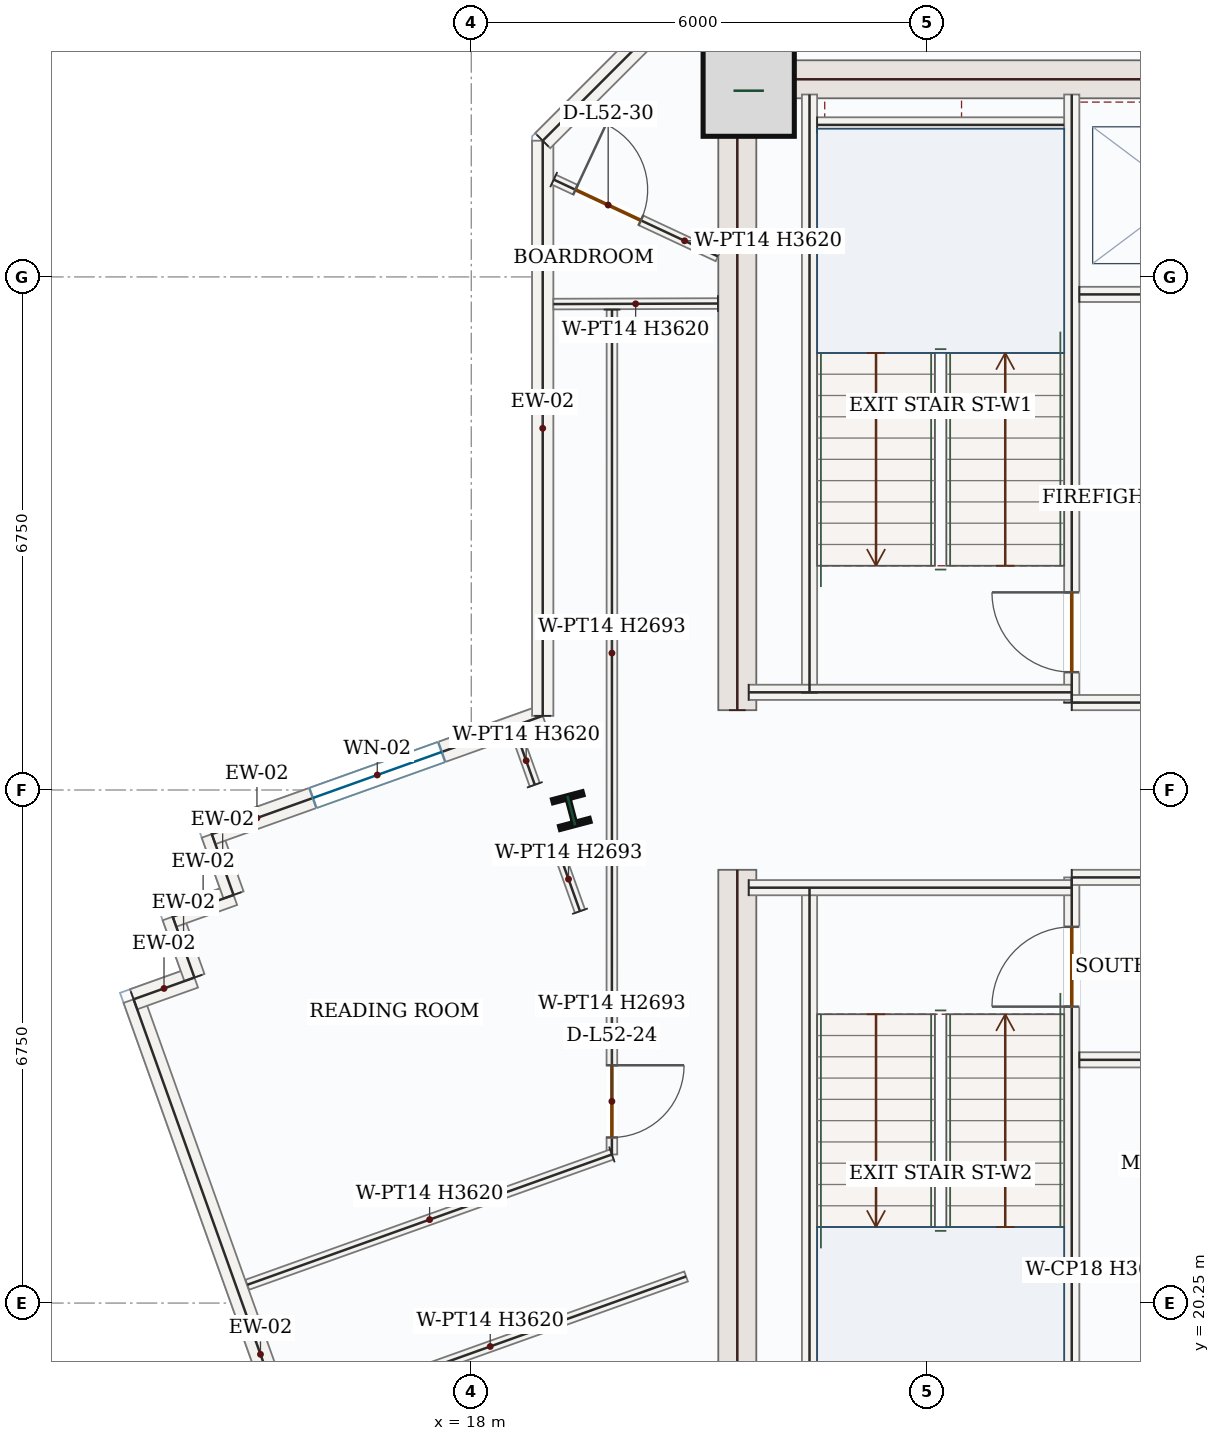
"""IFC4 building model, lengths in metres.
Left out: names, types, materials, properties, quantities, classifications, styles, units other than length and angle.
Written with IfcOpenShell. Run it as: python <this file> out.ifc"""

import sys

from ifc_helpers import new_model, si_unit, direction, frame, frame_2d, origin, origin_2d, place, context, subcontext, project, spatial, rectangle, i_section, extrude, source, transform, mapped, element, fill, save


model = new_model("IFC4")
c1 = context("Model", 3, precision=1e-05, world=origin(), true_north=direction((0.0, 1.0)))
c2 = subcontext(c1, "Body", "Model", "MODEL_VIEW")
j1 = project(units=[si_unit("LENGTHUNIT", "METRE"), si_unit("PLANEANGLEUNIT", "RADIAN")], contexts=[c1])
p1 = place(None, origin())
s1 = spatial("IfcSite", under=j1, at=p1, CompositionType="ELEMENT")
p2 = place(p1, origin())
s2 = spatial("IfcBuilding", under=s1, at=p2, CompositionType="ELEMENT")
p3 = place(p2, frame((0.0, 0.0, 221.4)))
s3 = spatial("IfcBuildingStorey", under=s2, at=p3, CompositionType="ELEMENT", Elevation=221.4)
m1 = source(origin(), c2, "Body", "SweptSolid", [
    extrude(rectangle(XDim=8.55, YDim=0.5, at=frame_2d((4.275, 0.0))), origin(), (0.0, 0.0, 1.0), 3.62),
])
for number, where, z_axis, x_axis in (
    (1, (21.5, 17.4, 0.0), (0.0, 0.0, 1.0), (0.0, 1.0, 0.0)),
    (2, (21.5, 28.05, 0.0), (0.0, 0.0, 1.0), (0.0, 1.0, 0.0)),
):
    element("IfcWall", number, at=place(p3, frame(where, z_axis=z_axis, x_axis=x_axis)), inside=s3, PredefinedType="SHEAR", context=c2, shape_type="MappedRepresentation", body=[
        mapped(m1, transform((0.0, 0.0, 0.0), x_axis=(1.0, 0.0, 0.0), y_axis=(0.0, 1.0, 0.0), z_axis=(0.0, 0.0, 1.0), scale=1.0)),
    ])
m2 = source(origin(), c2, "Body", "SweptSolid", [
    extrude(rectangle(XDim=7.0, YDim=0.5, at=frame_2d((3.5, 0.0))), origin(), (0.0, 0.0, 1.0), 3.62),
])
p4 = place(p3, frame((21.75, 36.35, 0.0), z_axis=(0.0, 0.0, 1.0), x_axis=(1.0, 0.0, 0.0)))
e3 = element("IfcWall", 3, at=p4, inside=s3, PredefinedType="SHEAR", context=c2, shape_type="MappedRepresentation", body=[
    mapped(m2, transform((0.0, 0.0, 0.0), x_axis=(1.0, 0.0, 0.0), y_axis=(0.0, 1.0, 0.0), z_axis=(0.0, 0.0, 1.0), scale=1.0)),
])
m3 = source(origin(), c2, "Body", "SweptSolid", [
    extrude(rectangle(XDim=1.2, YDim=1.2, at=origin_2d()), origin(), (0.0, 0.0, 1.0), 3.9),
])
p5 = place(p3, frame((21.65, 36.2, 0.0), z_axis=(0.0, 0.0, 1.0), x_axis=(1.0, 0.0, 0.0)))
e4 = element("IfcColumn", 4, at=p5, inside=s3, PredefinedType="COLUMN", context=c2, shape_type="MappedRepresentation", body=[
    mapped(m3, transform((0.0, 0.0, 0.0), x_axis=(1.0, 0.0, 0.0), y_axis=(0.0, 1.0, 0.0), z_axis=(0.0, 0.0, 1.0), scale=1.0)),
])
m4 = source(origin(), c2, "Body", "SweptSolid", [
    extrude(i_section(OverallWidth=0.404, OverallDepth=0.407, WebThickness=0.027, FlangeThickness=0.044, FilletRadius=0.018, at=origin_2d()), origin(), (0.0, 0.0, 1.0), 3.9),
])
p6 = place(p3, frame((19.316, 26.729, 0.0), z_axis=(0.0, 0.0, 1.0), x_axis=(0.966823388604, 0.255445757936, 0.0)))
e5 = element("IfcColumn", 5, at=p6, inside=s3, PredefinedType="COLUMN", context=c2, shape_type="MappedRepresentation", body=[
    mapped(m4, transform((0.0, 0.0, 0.0), x_axis=(1.0, 0.0, 0.0), y_axis=(0.0, 1.0, 0.0), z_axis=(0.0, 0.0, 1.0), scale=1.0)),
])
m5 = source(origin(), c2, "Body", "SweptSolid", [
    extrude(rectangle(XDim=9.92, YDim=0.28, at=frame_2d((4.96, 0.0))), origin(), (0.0, 0.0, 1.0), 3.62),
])
p7 = place(p3, frame((16.896, 14.905, 0.0), z_axis=(0.0, 0.0, 1.0), x_axis=(-0.336532833412, 0.941671732631, 0.0)))
e6 = element("IfcWall", 6, at=p7, inside=s3, PredefinedType="SOLIDWALL", context=c2, shape_type="MappedRepresentation", body=[
    mapped(m5, transform((0.0, 0.0, 0.0), x_axis=(1.0, 0.0, 0.0), y_axis=(0.0, 1.0, 0.0), z_axis=(0.0, 0.0, 1.0), scale=1.0)),
])
m6 = source(origin(), c2, "Body", "SweptSolid", [
    extrude(rectangle(XDim=0.85, YDim=0.28, at=frame_2d((0.425, 0.0))), origin(), (0.0, 0.0, 1.0), 3.62),
])
p8 = place(p3, frame((13.558, 24.246, 0.0), z_axis=(0.0, 0.0, 1.0), x_axis=(0.941624872587, 0.33666392638, 0.0)))
e7 = element("IfcWall", 7, at=p8, inside=s3, PredefinedType="SOLIDWALL", context=c2, shape_type="MappedRepresentation", body=[
    mapped(m6, transform((0.0, 0.0, 0.0), x_axis=(1.0, 0.0, 0.0), y_axis=(0.0, 1.0, 0.0), z_axis=(0.0, 0.0, 1.0), scale=1.0)),
])
m7 = source(origin(), c2, "Body", "SweptSolid", [
    extrude(rectangle(XDim=0.85, YDim=0.28, at=frame_2d((0.425, 0.0))), origin(), (0.0, 0.0, 1.0), 3.62),
])
p9 = place(p3, frame((14.358, 24.532, 0.0), z_axis=(0.0, 0.0, 1.0), x_axis=(-0.336318202891, 0.941748409292, 0.0)))
e8 = element("IfcWall", 8, at=p9, inside=s3, PredefinedType="SOLIDWALL", context=c2, shape_type="MappedRepresentation", body=[
    mapped(m7, transform((0.0, 0.0, 0.0), x_axis=(1.0, 0.0, 0.0), y_axis=(0.0, 1.0, 0.0), z_axis=(0.0, 0.0, 1.0), scale=1.0)),
])
p10 = place(p3, frame((14.072, 25.333, 0.0), z_axis=(0.0, 0.0, 1.0), x_axis=(0.941715910258, 0.336409191858, 0.0)))
e9 = element("IfcWall", 9, at=p10, inside=s3, PredefinedType="SOLIDWALL", context=c2, shape_type="MappedRepresentation", body=[
    mapped(m6, transform((0.0, 0.0, 0.0), x_axis=(1.0, 0.0, 0.0), y_axis=(0.0, 1.0, 0.0), z_axis=(0.0, 0.0, 1.0), scale=1.0)),
])
p11 = place(p3, frame((14.872, 25.619, 0.0), z_axis=(0.0, 0.0, 1.0), x_axis=(-0.336572886112, 0.941657417713, 0.0)))
e10 = element("IfcWall", 10, at=p11, inside=s3, PredefinedType="SOLIDWALL", context=c2, shape_type="MappedRepresentation", body=[
    mapped(m7, transform((0.0, 0.0, 0.0), x_axis=(1.0, 0.0, 0.0), y_axis=(0.0, 1.0, 0.0), z_axis=(0.0, 0.0, 1.0), scale=1.0)),
])
p12 = place(p3, frame((14.586, 26.419, 0.0), z_axis=(0.0, 0.0, 1.0), x_axis=(0.941673795185, 0.336527062004, 0.0)))
e11 = element("IfcWall", 11, at=p12, inside=s3, PredefinedType="SOLIDWALL", context=c2, shape_type="SweptSolid", body=[
    extrude(rectangle(XDim=4.624, YDim=0.28, at=frame_2d((2.312, 0.0))), origin(), (0.0, 0.0, 1.0), 3.62),
])
p13 = place(p12, frame((1.412, 0.0, 0.85)))
e12 = element("IfcOpeningElement", 12, at=p13, cuts=e11, PredefinedType="OPENING", context=c2, shape_type="SweptSolid", body=[
    extrude(rectangle(XDim=1.8, YDim=1.75, at=frame_2d((0.9, 0.875))), frame((0.0, 0.15, 0.0), z_axis=(0.0, -1.0, 0.0), x_axis=(1.0, 0.0, 0.0)), (0.0, 0.0, 1.0), 0.3),
])
m8 = source(origin(), c2, "Body", "SweptSolid", [
    extrude(rectangle(XDim=7.567, YDim=0.28, at=frame_2d((3.783, 0.0))), origin(), (0.0, 0.0, 1.0), 3.62),
])
p14 = place(p3, frame((18.94, 27.975, 0.0), z_axis=(0.0, 0.0, 1.0), x_axis=(0.0, 1.0, 0.0)))
e13 = element("IfcWall", 13, at=p14, inside=s3, PredefinedType="SOLIDWALL", context=c2, shape_type="MappedRepresentation", body=[
    mapped(m8, transform((0.0, 0.0, 0.0), x_axis=(1.0, 0.0, 0.0), y_axis=(0.0, 1.0, 0.0), z_axis=(0.0, 0.0, 1.0), scale=1.0)),
])
m9 = source(origin(), c2, "Body", "SweptSolid", [
    extrude(rectangle(XDim=5.258, YDim=0.28, at=frame_2d((2.629, 0.0))), origin(), (0.0, 0.0, 1.0), 3.62),
])
p15 = place(p3, frame((18.94, 35.542, 0.0), z_axis=(0.0, 0.0, 1.0), x_axis=(0.707106781187, 0.707106781187, 0.0)))
e14 = element("IfcWall", 14, at=p15, inside=s3, PredefinedType="SOLIDWALL", context=c2, shape_type="MappedRepresentation", body=[
    mapped(m9, transform((0.0, 0.0, 0.0), x_axis=(1.0, 0.0, 0.0), y_axis=(0.0, 1.0, 0.0), z_axis=(0.0, 0.0, 1.0), scale=1.0)),
])
m10 = source(origin(), c2, "Body", "SweptSolid", [
    extrude(rectangle(XDim=7.87, YDim=0.2, at=frame_2d((3.935, 0.0))), origin(), (0.0, 0.0, 1.0), 3.62),
])
for number, where, z_axis, x_axis in (
    (15, (22.45, 17.85, 0.0), (0.0, 0.0, 1.0), (0.0, 1.0, 0.0)),
    (16, (22.45, 28.28, 0.0), (0.0, 0.0, 1.0), (0.0, 1.0, 0.0)),
):
    element("IfcWall", number, at=place(p3, frame(where, z_axis=z_axis, x_axis=x_axis)), inside=s3, PredefinedType="SOLIDWALL", context=c2, shape_type="MappedRepresentation", body=[
        mapped(m10, transform((0.0, 0.0, 0.0), x_axis=(1.0, 0.0, 0.0), y_axis=(0.0, 1.0, 0.0), z_axis=(0.0, 0.0, 1.0), scale=1.0)),
    ])
p16 = place(p3, frame((25.9, 17.85, 0.0), z_axis=(0.0, 0.0, 1.0), x_axis=(0.0, 1.0, 0.0)))
e17 = element("IfcWall", 17, at=p16, inside=s3, PredefinedType="SOLIDWALL", context=c2, shape_type="SweptSolid", body=[
    extrude(rectangle(XDim=8.0, YDim=0.2, at=frame_2d((4.0, 0.0))), origin(), (0.0, 0.0, 1.0), 3.62),
])
p17 = place(p16, frame((6.3, 0.0, 0.0)))
e18 = element("IfcOpeningElement", 18, at=p17, cuts=e17, PredefinedType="OPENING", context=c2, shape_type="SweptSolid", body=[
    extrude(rectangle(XDim=1.05, YDim=2.15, at=frame_2d((0.525, 1.075))), frame((0.0, 0.11, 0.0), z_axis=(0.0, -1.0, 0.0), x_axis=(1.0, 0.0, 0.0)), (0.0, 0.0, 1.0), 0.22),
])
p18 = place(p3, frame((25.9, 28.15, 0.0), z_axis=(0.0, 0.0, 1.0), x_axis=(0.0, 1.0, 0.0)))
e19 = element("IfcWall", 19, at=p18, inside=s3, PredefinedType="SOLIDWALL", context=c2, shape_type="SweptSolid", body=[
    extrude(rectangle(XDim=8.0, YDim=0.2, at=frame_2d((4.0, 0.0))), origin(), (0.0, 0.0, 1.0), 3.62),
])
p19 = place(p18, frame((0.4, 0.0, 0.0)))
e20 = element("IfcOpeningElement", 20, at=p19, cuts=e19, PredefinedType="OPENING", context=c2, shape_type="SweptSolid", body=[
    extrude(rectangle(XDim=1.05, YDim=2.15, at=frame_2d((0.525, 1.075))), frame((0.0, 0.11, 0.0), z_axis=(0.0, -1.0, 0.0), x_axis=(1.0, 0.0, 0.0)), (0.0, 0.0, 1.0), 0.22),
])
m11 = source(origin(), c2, "Body", "SweptSolid", [
    extrude(rectangle(XDim=4.25, YDim=0.2, at=frame_2d((2.125, 0.0))), origin(), (0.0, 0.0, 1.0), 3.62),
])
p20 = place(p3, frame((21.65, 25.715, 0.0), z_axis=(0.0, 0.0, 1.0), x_axis=(1.0, 0.0, 0.0)))
e21 = element("IfcWall", 21, at=p20, inside=s3, PredefinedType="SOLIDWALL", context=c2, shape_type="MappedRepresentation", body=[
    mapped(m11, transform((0.0, 0.0, 0.0), x_axis=(1.0, 0.0, 0.0), y_axis=(0.0, 1.0, 0.0), z_axis=(0.0, 0.0, 1.0), scale=1.0)),
])
m12 = source(origin(), c2, "Body", "SweptSolid", [
    extrude(rectangle(XDim=3.0, YDim=0.2, at=frame_2d((1.5, 0.0))), origin(), (0.0, 0.0, 1.0), 3.62),
])
p21 = place(p3, frame((25.9, 25.85, 0.0), z_axis=(0.0, 0.0, 1.0), x_axis=(1.0, 0.0, 0.0)))
e22 = element("IfcWall", 22, at=p21, inside=s3, PredefinedType="SOLIDWALL", context=c2, shape_type="MappedRepresentation", body=[
    mapped(m12, transform((0.0, 0.0, 0.0), x_axis=(1.0, 0.0, 0.0), y_axis=(0.0, 1.0, 0.0), z_axis=(0.0, 0.0, 1.0), scale=1.0)),
])
p22 = place(p3, frame((21.65, 28.285, 0.0), z_axis=(0.0, 0.0, 1.0), x_axis=(1.0, 0.0, 0.0)))
e23 = element("IfcWall", 23, at=p22, inside=s3, PredefinedType="SOLIDWALL", context=c2, shape_type="MappedRepresentation", body=[
    mapped(m11, transform((0.0, 0.0, 0.0), x_axis=(1.0, 0.0, 0.0), y_axis=(0.0, 1.0, 0.0), z_axis=(0.0, 0.0, 1.0), scale=1.0)),
])
p23 = place(p3, frame((25.9, 28.15, 0.0), z_axis=(0.0, 0.0, 1.0), x_axis=(1.0, 0.0, 0.0)))
e24 = element("IfcWall", 24, at=p23, inside=s3, PredefinedType="SOLIDWALL", context=c2, shape_type="MappedRepresentation", body=[
    mapped(m12, transform((0.0, 0.0, 0.0), x_axis=(1.0, 0.0, 0.0), y_axis=(0.0, 1.0, 0.0), z_axis=(0.0, 0.0, 1.0), scale=1.0)),
])
m13 = source(origin(), c2, "Body", "SweptSolid", [
    extrude(rectangle(XDim=3.25, YDim=0.2, at=frame_2d((1.625, 0.0))), origin(), (0.0, 0.0, 1.0), 3.62),
])
p24 = place(p3, frame((22.55, 35.75, 0.0), z_axis=(0.0, 0.0, 1.0), x_axis=(1.0, 0.0, 0.0)))
e25 = element("IfcWall", 25, at=p24, inside=s3, PredefinedType="SOLIDWALL", context=c2, shape_type="MappedRepresentation", body=[
    mapped(m13, transform((0.0, 0.0, 0.0), x_axis=(1.0, 0.0, 0.0), y_axis=(0.0, 1.0, 0.0), z_axis=(0.0, 0.0, 1.0), scale=1.0)),
])
p25 = place(p3, frame((26.0, 33.52, 0.0), z_axis=(0.0, 0.0, 1.0), x_axis=(1.0, 0.0, 0.0)))
e26 = element("IfcWall", 26, at=p25, inside=s3, PredefinedType="SOLIDWALL", context=c2, shape_type="SweptSolid", body=[
    extrude(rectangle(XDim=2.75, YDim=0.2, at=frame_2d((1.375, 0.0))), origin(), (0.0, 0.0, 1.0), 3.62),
])
p26 = place(p25, frame((0.82, 0.0, 0.0)))
e27 = element("IfcOpeningElement", 27, at=p26, cuts=e26, PredefinedType="OPENING", context=c2, shape_type="SweptSolid", body=[
    extrude(rectangle(XDim=1.1, YDim=2.15, at=frame_2d((0.55, 1.075))), frame((0.0, 0.11, 0.0), z_axis=(0.0, -1.0, 0.0), x_axis=(1.0, 0.0, 0.0)), (0.0, 0.0, 1.0), 0.22),
])
m14 = source(origin(), c2, "Body", "SweptSolid", [
    extrude(rectangle(XDim=2.75, YDim=0.2, at=frame_2d((1.375, 0.0))), origin(), (0.0, 0.0, 1.0), 3.62),
])
p27 = place(p3, frame((26.0, 23.45, 0.0), z_axis=(0.0, 0.0, 1.0), x_axis=(1.0, 0.0, 0.0)))
e28 = element("IfcWall", 28, at=p27, inside=s3, PredefinedType="SOLIDWALL", context=c2, shape_type="MappedRepresentation", body=[
    mapped(m14, transform((0.0, 0.0, 0.0), x_axis=(1.0, 0.0, 0.0), y_axis=(0.0, 1.0, 0.0), z_axis=(0.0, 0.0, 1.0), scale=1.0)),
])
m15 = source(origin(), c2, "Body", "SweptSolid", [
    extrude(rectangle(XDim=2.75, YDim=0.18, at=frame_2d((1.375, 0.0))), origin(), (0.0, 0.0, 1.0), 3.62),
])
p28 = place(p3, frame((26.0, 20.68, 0.0), z_axis=(0.0, 0.0, 1.0), x_axis=(1.0, 0.0, 0.0)))
e29 = element("IfcWall", 29, at=p28, inside=s3, PredefinedType="PARTITIONING", context=c2, shape_type="MappedRepresentation", body=[
    mapped(m15, transform((0.0, 0.0, 0.0), x_axis=(1.0, 0.0, 0.0), y_axis=(0.0, 1.0, 0.0), z_axis=(0.0, 0.0, 1.0), scale=1.0)),
])
m16 = source(origin(), c2, "Body", "SweptSolid", [
    extrude(rectangle(XDim=2.165, YDim=0.14, at=frame_2d((1.083, 0.0))), origin(), (0.0, 0.0, 1.0), 3.62),
])
p29 = place(p3, frame((21.245, 33.4, 0.0), z_axis=(0.0, 0.0, 1.0), x_axis=(-0.999994277874, -0.003382930575, 0.0)))
e30 = element("IfcWall", 30, at=p29, inside=s3, PredefinedType="PARTITIONING", context=c2, shape_type="MappedRepresentation", body=[
    mapped(m16, transform((0.0, 0.0, 0.0), x_axis=(1.0, 0.0, 0.0), y_axis=(0.0, 1.0, 0.0), z_axis=(0.0, 0.0, 1.0), scale=1.0)),
])
m17 = source(origin(), c2, "Body", "SweptSolid", [
    extrude(rectangle(XDim=9.038, YDim=0.14, at=frame_2d((4.519, 0.0))), origin(), (0.0, 0.0, 1.0), 2.693),
])
p30 = place(p3, frame((19.851, 33.32, 0.0), z_axis=(0.0, 0.0, 1.0), x_axis=(-0.000135065776, -0.999999990879, 0.0)))
e31 = element("IfcWall", 31, at=p30, inside=s3, PredefinedType="PARTITIONING", context=c2, shape_type="MappedRepresentation", body=[
    mapped(m17, transform((0.0, 0.0, 0.0), x_axis=(1.0, 0.0, 0.0), y_axis=(0.0, 1.0, 0.0), z_axis=(0.0, 0.0, 1.0), scale=1.0)),
])
m18 = source(origin(), c2, "Body", "SweptSolid", [
    extrude(rectangle(XDim=0.896, YDim=0.14, at=frame_2d((0.448, 0.0))), origin(), (0.0, 0.0, 1.0), 2.693),
])
p31 = place(p3, frame((19.43, 25.405, 0.0), z_axis=(0.0, 0.0, 1.0), x_axis=(-0.336509001165, 0.941680249413, 0.0)))
e32 = element("IfcWall", 32, at=p31, inside=s3, PredefinedType="PARTITIONING", context=c2, shape_type="MappedRepresentation", body=[
    mapped(m18, transform((0.0, 0.0, 0.0), x_axis=(1.0, 0.0, 0.0), y_axis=(0.0, 1.0, 0.0), z_axis=(0.0, 0.0, 1.0), scale=1.0)),
])
m19 = source(origin(), c2, "Body", "SweptSolid", [
    extrude(rectangle(XDim=0.674, YDim=0.14, at=frame_2d((0.337, 0.0))), origin(), (0.0, 0.0, 1.0), 3.62),
])
p32 = place(p3, frame((18.836, 27.069, 0.0), z_axis=(0.0, 0.0, 1.0), x_axis=(-0.336588856473, 0.941651709337, 0.0)))
e33 = element("IfcWall", 33, at=p32, inside=s3, PredefinedType="PARTITIONING", context=c2, shape_type="MappedRepresentation", body=[
    mapped(m19, transform((0.0, 0.0, 0.0), x_axis=(1.0, 0.0, 0.0), y_axis=(0.0, 1.0, 0.0), z_axis=(0.0, 0.0, 1.0), scale=1.0)),
])
p33 = place(p3, frame((19.085, 35.03, 0.0), z_axis=(0.0, 0.0, 1.0), x_axis=(0.905832355445, -0.423636334407, 0.0)))
e34 = element("IfcWall", 34, at=p33, inside=s3, PredefinedType="PARTITIONING", context=c2, shape_type="SweptSolid", body=[
    extrude(rectangle(XDim=2.385, YDim=0.14, at=frame_2d((1.192, 0.0))), origin(), (0.0, 0.0, 1.0), 3.62),
])
p34 = place(p33, frame((0.316, 0.0, 0.0)))
e35 = element("IfcOpeningElement", 35, at=p34, cuts=e34, PredefinedType="OPENING", context=c2, shape_type="SweptSolid", body=[
    extrude(rectangle(XDim=0.95, YDim=2.15, at=frame_2d((0.475, 1.075))), frame((0.0, 0.08, 0.0), z_axis=(0.0, -1.0, 0.0), x_axis=(1.0, 0.0, 0.0)), (0.0, 0.0, 1.0), 0.16),
])
p35 = place(p3, frame((19.85, 24.171, 0.0), z_axis=(0.0, 0.0, 1.0), x_axis=(0.0, -1.0, 0.0)))
e36 = element("IfcWall", 36, at=p35, inside=s3, PredefinedType="PARTITIONING", context=c2, shape_type="SweptSolid", body=[
    extrude(rectangle(XDim=1.966, YDim=0.14, at=frame_2d((0.983, 0.0))), origin(), (0.0, 0.0, 1.0), 2.693),
])
p36 = place(p35, frame((0.792, 0.0, 0.0)))
e37 = element("IfcOpeningElement", 37, at=p36, cuts=e36, PredefinedType="OPENING", context=c2, shape_type="SweptSolid", body=[
    extrude(rectangle(XDim=0.95, YDim=2.15, at=frame_2d((0.475, 1.075))), frame((0.0, 0.08, 0.0), z_axis=(0.0, -1.0, 0.0), x_axis=(1.0, 0.0, 0.0)), (0.0, 0.0, 1.0), 0.16),
])
m20 = source(origin(), c2, "Body", "SweptSolid", [
    extrude(rectangle(XDim=5.093, YDim=0.14, at=frame_2d((2.547, 0.0))), origin(), (0.0, 0.0, 1.0), 3.62),
])
p37 = place(p3, frame((19.85, 22.205, 0.0), z_axis=(0.0, 0.0, 1.0), x_axis=(-0.941667058904, -0.336545910947, 0.0)))
e38 = element("IfcWall", 38, at=p37, inside=s3, PredefinedType="PARTITIONING", context=c2, shape_type="MappedRepresentation", body=[
    mapped(m20, transform((0.0, 0.0, 0.0), x_axis=(1.0, 0.0, 0.0), y_axis=(0.0, 1.0, 0.0), z_axis=(0.0, 0.0, 1.0), scale=1.0)),
])
m21 = source(origin(), c2, "Body", "SweptSolid", [
    extrude(rectangle(XDim=5.473, YDim=0.14, at=frame_2d((2.736, 0.0))), origin(), (0.0, 0.0, 1.0), 3.62),
])
p38 = place(p3, frame((15.673, 18.758, 0.0), z_axis=(0.0, 0.0, 1.0), x_axis=(0.941665179086, 0.336551170695, 0.0)))
e39 = element("IfcWall", 39, at=p38, inside=s3, PredefinedType="PARTITIONING", context=c2, shape_type="MappedRepresentation", body=[
    mapped(m21, transform((0.0, 0.0, 0.0), x_axis=(1.0, 0.0, 0.0), y_axis=(0.0, 1.0, 0.0), z_axis=(0.0, 0.0, 1.0), scale=1.0)),
])
m22 = source(origin(), c2, "Body", "SweptSolid", [
    extrude(rectangle(XDim=1.8, YDim=1.75, at=frame_2d((0.9, 0.875))), frame((0.0, 0.03, 0.0), z_axis=(0.0, -1.0, 0.0), x_axis=(1.0, 0.0, 0.0)), (0.0, 0.0, 1.0), 0.06),
])
p39 = place(p13, origin())
e40 = element("IfcWindow", 40, at=p39, inside=s3, PartitioningType="DOUBLE_PANEL_VERTICAL", PredefinedType="WINDOW", context=c2, shape_type="MappedRepresentation", body=[
    mapped(m22, transform((0.0, 0.0, 0.0), x_axis=(1.0, 0.0, 0.0), y_axis=(0.0, 1.0, 0.0), z_axis=(0.0, 0.0, 1.0), scale=1.0)),
])
fill(e12, e40)
m23 = source(origin(), c2, "Body", "SweptSolid", [
    extrude(rectangle(XDim=1.05, YDim=2.15, at=frame_2d((0.525, 1.075))), frame((0.0, 0.025, 0.0), z_axis=(0.0, -1.0, 0.0), x_axis=(1.0, 0.0, 0.0)), (0.0, 0.0, 1.0), 0.05),
])
p40 = place(p19, origin())
e41 = element("IfcDoor", 41, at=p40, inside=s3, OperationType="SINGLE_SWING_RIGHT", PredefinedType="DOOR", context=c2, shape_type="MappedRepresentation", body=[
    mapped(m23, transform((0.0, 0.0, 0.0), x_axis=(1.0, 0.0, 0.0), y_axis=(0.0, 1.0, 0.0), z_axis=(0.0, 0.0, 1.0), scale=1.0)),
])
fill(e20, e41)
p41 = place(p17, origin())
e42 = element("IfcDoor", 42, at=p41, inside=s3, OperationType="SINGLE_SWING_LEFT", PredefinedType="DOOR", context=c2, shape_type="MappedRepresentation", body=[
    mapped(m23, transform((0.0, 0.0, 0.0), x_axis=(1.0, 0.0, 0.0), y_axis=(0.0, 1.0, 0.0), z_axis=(0.0, 0.0, 1.0), scale=1.0)),
])
fill(e18, e42)
m24 = source(origin(), c2, "Body", "SweptSolid", [
    extrude(rectangle(XDim=0.95, YDim=2.15, at=frame_2d((0.475, 1.075))), frame((0.0, 0.025, 0.0), z_axis=(0.0, -1.0, 0.0), x_axis=(1.0, 0.0, 0.0)), (0.0, 0.0, 1.0), 0.05),
])
p42 = place(p36, origin())
e43 = element("IfcDoor", 43, at=p42, inside=s3, OperationType="SINGLE_SWING_LEFT", PredefinedType="DOOR", context=c2, shape_type="MappedRepresentation", body=[
    mapped(m24, transform((0.0, 0.0, 0.0), x_axis=(1.0, 0.0, 0.0), y_axis=(0.0, 1.0, 0.0), z_axis=(0.0, 0.0, 1.0), scale=1.0)),
])
fill(e37, e43)
p43 = place(p34, origin())
e44 = element("IfcDoor", 44, at=p43, inside=s3, OperationType="SINGLE_SWING_LEFT", PredefinedType="DOOR", context=c2, shape_type="MappedRepresentation", body=[
    mapped(m24, transform((0.0, 0.0, 0.0), x_axis=(1.0, 0.0, 0.0), y_axis=(0.0, 1.0, 0.0), z_axis=(0.0, 0.0, 1.0), scale=1.0)),
])
fill(e35, e44)
save(model, sys.argv[1])
